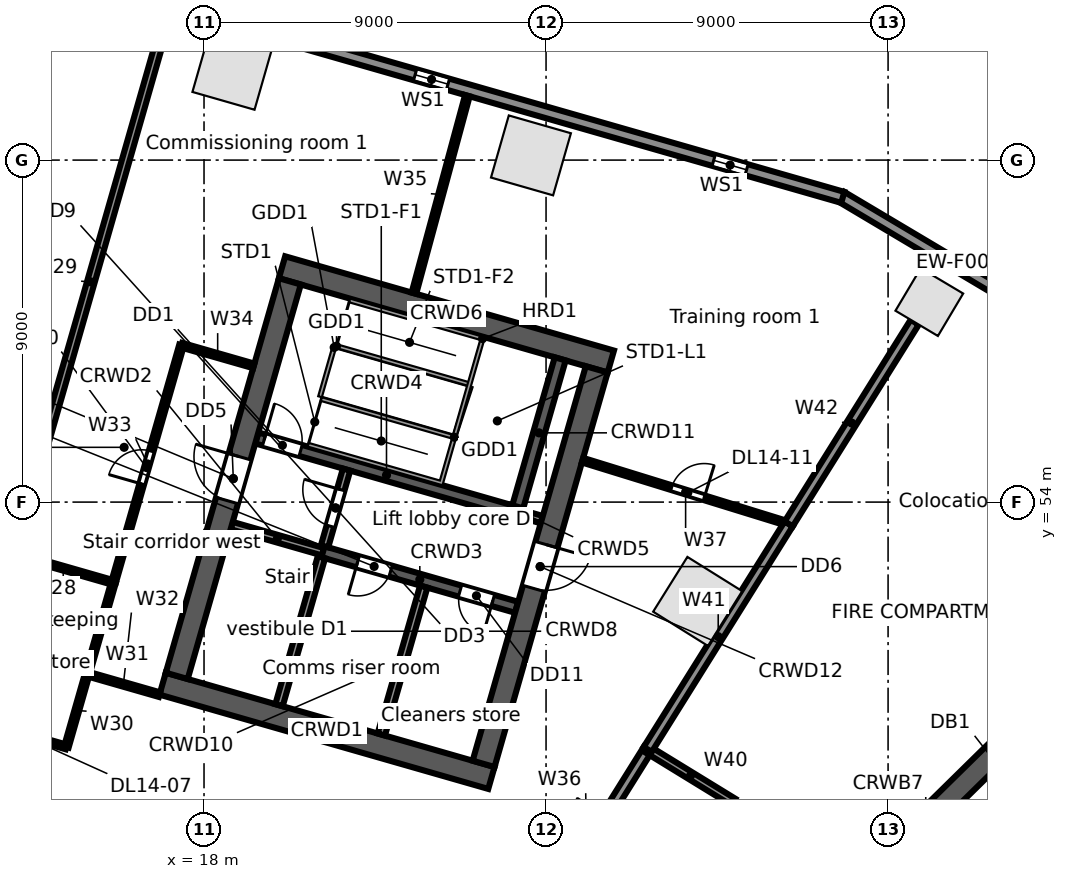
"""IFC4 building model, lengths in metres.
Left out: names, types, materials, properties, quantities, classifications, styles, units other than length and angle.
Written with IfcOpenShell. Run it as: python <this file> out.ifc"""

import sys

from ifc_helpers import new_model, si_unit, direction, frame, frame_2d, origin, origin_2d, place, context, subcontext, project, spatial, rectangle, extrude, element, fill, save


model = new_model("IFC4")
c1 = context("Model", 3, precision=1e-05, world=origin(), true_north=direction((0.0, 1.0)))
c2 = subcontext(c1, "Body", "Model", "MODEL_VIEW")
j1 = project(units=[si_unit("LENGTHUNIT", "METRE"), si_unit("PLANEANGLEUNIT", "RADIAN")], contexts=[c1])
p1 = place(None, origin())
s1 = spatial("IfcSite", under=j1, at=p1, CompositionType="ELEMENT")
p2 = place(p1, origin())
s2 = spatial("IfcBuilding", under=s1, at=p2, CompositionType="ELEMENT")
p3 = place(p2, frame((0.0, 0.0, 71.5)))
s3 = spatial("IfcBuildingStorey", under=s2, at=p3, CompositionType="ELEMENT", Elevation=71.5)
p4 = place(p3, frame((37.085, 59.262, 0.0), z_axis=(0.0, 0.0, 1.0), x_axis=(-0.859406411501, 0.511293086077, 0.0)))
e1 = element("IfcColumn", 1, at=p4, inside=s3, PredefinedType="COLUMN", context=c2, shape_type="SweptSolid", body=[
    extrude(rectangle(XDim=1.3, YDim=1.3, at=origin_2d()), origin(), (0.0, 0.0, 1.0), 5.0),
])
for number, where, z_axis, x_axis in (
    (2, (26.603, 63.124, 0.0), (0.0, 0.0, 1.0), (-0.961, 0.276, 0.0)),
    (3, (18.746, 65.376, 0.0), (0.0, 0.0, 1.0), (-0.961, 0.276, 0.0)),
    (4, (30.99, 51.386, 0.0), (0.0, 0.0, 1.0), (0.53, 0.848, 0.0)),
):
    element("IfcColumn", number, at=place(p3, frame(where, z_axis=z_axis, x_axis=x_axis)), inside=s3, PredefinedType="COLUMN", context=c2, shape_type="SweptSolid", body=[
        extrude(rectangle(XDim=1.7, YDim=1.7, at=origin_2d()), origin(), (0.0, 0.0, 1.0), 5.0),
    ])
p5 = place(p3, frame((34.773, 62.034, 0.0), z_axis=(0.0, 0.0, 1.0), x_axis=(0.859401317772, -0.511301647769, 0.0)))
e5 = element("IfcWall", 5, at=p5, inside=s3, PredefinedType="STANDARD", context=c2, shape_type="SweptSolid", body=[
    extrude(rectangle(XDim=6.808, YDim=0.3, at=frame_2d((3.404, 0.0))), origin(), (0.0, 0.0, 1.0), 4.68),
])
p6 = place(p3, frame((3.335, 71.044, 0.0), z_axis=(0.0, 0.0, 1.0), x_axis=(0.961260130989, -0.275642813387, 0.0)))
e6 = element("IfcWall", 6, at=p6, inside=s3, PredefinedType="STANDARD", context=c2, shape_type="SweptSolid", body=[
    extrude(rectangle(XDim=32.741, YDim=0.3, at=frame_2d((16.371, 0.0))), origin(), (0.0, 0.0, 1.0), 4.68),
])
p7 = place(p6, frame((29.207, 0.0, 0.6)))
e7 = element("IfcOpeningElement", 7, at=p7, cuts=e6, PredefinedType="OPENING", context=c2, shape_type="SweptSolid", body=[
    extrude(rectangle(XDim=0.9, YDim=3.2, at=frame_2d((0.45, 1.6))), frame((0.0, 0.16, 0.0), z_axis=(0.0, -1.0, 0.0), x_axis=(1.0, 0.0, 0.0)), (0.0, 0.0, 1.0), 0.32),
])
p8 = place(p6, frame((21.034, 0.0, 0.6)))
e8 = element("IfcOpeningElement", 8, at=p8, cuts=e6, PredefinedType="OPENING", context=c2, shape_type="SweptSolid", body=[
    extrude(rectangle(XDim=0.9, YDim=3.2, at=frame_2d((0.45, 1.6))), frame((0.0, 0.16, 0.0), z_axis=(0.0, -1.0, 0.0), x_axis=(1.0, 0.0, 0.0)), (0.0, 0.0, 1.0), 0.32),
])
p9 = place(p6, frame((12.861, 0.0, 0.6)))
e9 = element("IfcOpeningElement", 9, at=p9, cuts=e6, PredefinedType="OPENING", context=c2, shape_type="SweptSolid", body=[
    extrude(rectangle(XDim=0.9, YDim=3.2, at=frame_2d((0.45, 1.6))), frame((0.0, 0.16, 0.0), z_axis=(0.0, -1.0, 0.0), x_axis=(1.0, 0.0, 0.0)), (0.0, 0.0, 1.0), 0.32),
])
p10 = place(p6, frame((4.688, 0.0, 0.6)))
e10 = element("IfcOpeningElement", 10, at=p10, cuts=e6, PredefinedType="OPENING", context=c2, shape_type="SweptSolid", body=[
    extrude(rectangle(XDim=0.9, YDim=3.2, at=frame_2d((0.45, 1.6))), frame((0.0, 0.16, 0.0), z_axis=(0.0, -1.0, 0.0), x_axis=(1.0, 0.0, 0.0)), (0.0, 0.0, 1.0), 0.32),
])
p11 = place(p3, frame((25.398, 40.717, 0.0), z_axis=(0.0, 0.0, 1.0), x_axis=(-0.961262423262, 0.275634819324, 0.0)))
e11 = element("IfcWall", 11, at=p11, inside=s3, PredefinedType="STANDARD", context=c2, shape_type="SweptSolid", body=[
    extrude(rectangle(XDim=26.359, YDim=0.3, at=frame_2d((13.179, 0.0))), origin(), (0.0, 0.0, 1.0), 4.68),
])
p12 = place(p11, frame((22.664, 0.0, 0.6)))
e12 = element("IfcOpeningElement", 12, at=p12, cuts=e11, PredefinedType="OPENING", context=c2, shape_type="SweptSolid", body=[
    extrude(rectangle(XDim=0.9, YDim=3.2, at=frame_2d((0.45, 1.6))), frame((0.0, 0.16, 0.0), z_axis=(0.0, -1.0, 0.0), x_axis=(1.0, 0.0, 0.0)), (0.0, 0.0, 1.0), 0.32),
])
p13 = place(p11, frame((13.844, 0.0, 0.6)))
e13 = element("IfcOpeningElement", 13, at=p13, cuts=e11, PredefinedType="OPENING", context=c2, shape_type="SweptSolid", body=[
    extrude(rectangle(XDim=0.9, YDim=3.2, at=frame_2d((0.45, 1.6))), frame((0.0, 0.16, 0.0), z_axis=(0.0, -1.0, 0.0), x_axis=(1.0, 0.0, 0.0)), (0.0, 0.0, 1.0), 0.32),
])
p14 = place(p11, frame((5.023, 0.0, 0.6)))
e14 = element("IfcOpeningElement", 14, at=p14, cuts=e11, PredefinedType="OPENING", context=c2, shape_type="SweptSolid", body=[
    extrude(rectangle(XDim=0.9, YDim=3.2, at=frame_2d((0.45, 1.6))), frame((0.0, 0.16, 0.0), z_axis=(0.0, -1.0, 0.0), x_axis=(1.0, 0.0, 0.0)), (0.0, 0.0, 1.0), 0.32),
])
p15 = place(p3, frame((32.07, 40.759, 0.0), z_axis=(0.0, 0.0, 1.0), x_axis=(0.713245344712, 0.70091445858, 0.0)))
e15 = element("IfcWall", 15, at=p15, inside=s3, PredefinedType="SOLIDWALL", context=c2, shape_type="SweptSolid", body=[
    extrude(rectangle(XDim=13.8, YDim=0.6, at=frame_2d((6.9, 0.0))), origin(), (0.0, 0.0, 1.0), 4.68),
])
p16 = place(p3, frame((16.911, 49.221, 0.0), z_axis=(0.0, 0.0, 1.0), x_axis=(0.96126248289, -0.275634611374, 0.0)))
e16 = element("IfcWall", 16, at=p16, inside=s3, PredefinedType="SOLIDWALL", context=c2, shape_type="SweptSolid", body=[
    extrude(rectangle(XDim=9.0, YDim=0.6, at=frame_2d((4.5, 0.0))), origin(), (0.0, 0.0, 1.0), 4.68),
])
p17 = place(p3, frame((18.728, 53.382, 0.0), z_axis=(0.0, 0.0, 1.0), x_axis=(0.961247070632, -0.275688355216, 0.0)))
e17 = element("IfcWall", 17, at=p17, inside=s3, PredefinedType="SOLIDWALL", context=c2, shape_type="SweptSolid", body=[
    extrude(rectangle(XDim=2.5, YDim=0.2, at=frame_2d((1.25, 0.0))), origin(), (0.0, 0.0, 1.0), 4.68),
])
p18 = place(p3, frame((21.131, 52.692, 0.0), z_axis=(0.0, 0.0, 1.0), x_axis=(0.961271492568, -0.275603188616, 0.0)))
e18 = element("IfcWall", 18, at=p18, inside=s3, PredefinedType="SOLIDWALL", context=c2, shape_type="SweptSolid", body=[
    extrude(rectangle(XDim=5.3, YDim=0.3, at=frame_2d((2.65, 0.0))), origin(), (0.0, 0.0, 1.0), 4.68),
])
p19 = place(p18, frame((0.95, 0.0, 0.0)))
e19 = element("IfcOpeningElement", 19, at=p19, cuts=e18, PredefinedType="OPENING", context=c2, shape_type="SweptSolid", body=[
    extrude(rectangle(XDim=0.9, YDim=2.1, at=frame_2d((0.45, 1.05))), frame((0.0, 0.16, 0.0), z_axis=(0.0, -1.0, 0.0), x_axis=(1.0, 0.0, 0.0)), (0.0, 0.0, 1.0), 0.32),
])
p20 = place(p18, frame((3.75, 0.0, 0.0)))
e20 = element("IfcOpeningElement", 20, at=p20, cuts=e18, PredefinedType="OPENING", context=c2, shape_type="SweptSolid", body=[
    extrude(rectangle(XDim=0.9, YDim=2.1, at=frame_2d((0.45, 1.05))), frame((0.0, 0.16, 0.0), z_axis=(0.0, -1.0, 0.0), x_axis=(1.0, 0.0, 0.0)), (0.0, 0.0, 1.0), 0.32),
])
p21 = place(p3, frame((19.389, 55.689, 0.0), z_axis=(0.0, 0.0, 1.0), x_axis=(0.961261397636, -0.275638396117, 0.0)))
e21 = element("IfcWall", 21, at=p21, inside=s3, PredefinedType="SOLIDWALL", context=c2, shape_type="SweptSolid", body=[
    extrude(rectangle(XDim=7.1, YDim=0.3, at=frame_2d((3.55, 0.0))), origin(), (0.0, 0.0, 1.0), 4.68),
])
p22 = place(p21, frame((0.2, 0.0, 0.0)))
e22 = element("IfcOpeningElement", 22, at=p22, cuts=e21, PredefinedType="OPENING", context=c2, shape_type="SweptSolid", body=[
    extrude(rectangle(XDim=1.0, YDim=2.1, at=frame_2d((0.5, 1.05))), frame((0.0, 0.16, 0.0), z_axis=(0.0, -1.0, 0.0), x_axis=(1.0, 0.0, 0.0)), (0.0, 0.0, 1.0), 0.32),
])
p23 = place(p3, frame((26.214, 53.732, 0.0), z_axis=(0.0, 0.0, 1.0), x_axis=(0.96122076476, -0.27578005982, 0.0)))
e23 = element("IfcWall", 23, at=p23, inside=s3, PredefinedType="SOLIDWALL", context=c2, shape_type="SweptSolid", body=[
    extrude(rectangle(XDim=0.7, YDim=0.2, at=frame_2d((0.35, 0.0))), origin(), (0.0, 0.0, 1.0), 4.68),
])
p24 = place(p3, frame((20.053, 60.18, 0.0), z_axis=(0.0, 0.0, 1.0), x_axis=(0.96126248289, -0.275634611374, 0.0)))
e24 = element("IfcWall", 24, at=p24, inside=s3, PredefinedType="SOLIDWALL", context=c2, shape_type="SweptSolid", body=[
    extrude(rectangle(XDim=9.0, YDim=0.6, at=frame_2d((4.5, 0.0))), origin(), (0.0, 0.0, 1.0), 4.68),
])
p25 = place(p3, frame((17.282, 49.427, 0.0), z_axis=(0.0, 0.0, 1.0), x_axis=(0.275631631629, 0.961263337304, 0.0)))
e25 = element("IfcWall", 25, at=p25, inside=s3, PredefinedType="SOLIDWALL", context=c2, shape_type="SweptSolid", body=[
    extrude(rectangle(XDim=10.8, YDim=0.6, at=frame_2d((5.4, 0.0))), origin(), (0.0, 0.0, 1.0), 4.68),
])
p26 = place(p25, frame((4.8, 0.0, 0.0)))
e26 = element("IfcOpeningElement", 26, at=p26, cuts=e25, PredefinedType="OPENING", context=c2, shape_type="SweptSolid", body=[
    extrude(rectangle(XDim=1.2, YDim=2.1, at=frame_2d((0.6, 1.05))), frame((0.0, 0.31, 0.0), z_axis=(0.0, -1.0, 0.0), x_axis=(1.0, 0.0, 0.0)), (0.0, 0.0, 1.0), 0.62),
])
p27 = place(p3, frame((19.973, 48.655, 0.0), z_axis=(0.0, 0.0, 1.0), x_axis=(0.275668441653, 0.961252781674, 0.0)))
e27 = element("IfcWall", 27, at=p27, inside=s3, PredefinedType="SOLIDWALL", context=c2, shape_type="SweptSolid", body=[
    extrude(rectangle(XDim=4.05, YDim=0.2, at=frame_2d((2.025, 0.0))), origin(), (0.0, 0.0, 1.0), 4.68),
])
p28 = place(p3, frame((21.172, 52.837, 0.0), z_axis=(0.0, 0.0, 1.0), x_axis=(0.275657676022, 0.961255868981, 0.0)))
e28 = element("IfcWall", 28, at=p28, inside=s3, PredefinedType="PARTITIONING", context=c2, shape_type="SweptSolid", body=[
    extrude(rectangle(XDim=2.1, YDim=0.2, at=frame_2d((1.05, 0.0))), origin(), (0.0, 0.0, 1.0), 4.68),
])
p29 = place(p28, frame((0.55, 0.0, 0.0)))
e29 = element("IfcOpeningElement", 29, at=p29, cuts=e28, PredefinedType="OPENING", context=c2, shape_type="SweptSolid", body=[
    extrude(rectangle(XDim=1.0, YDim=2.1, at=frame_2d((0.5, 1.05))), frame((0.0, 0.11, 0.0), z_axis=(0.0, -1.0, 0.0), x_axis=(1.0, 0.0, 0.0)), (0.0, 0.0, 1.0), 0.22),
])
p30 = place(p3, frame((22.665, 47.883, 0.0), z_axis=(0.0, 0.0, 1.0), x_axis=(0.275596769212, 0.961273333033, 0.0)))
e30 = element("IfcWall", 30, at=p30, inside=s3, PredefinedType="PARTITIONING", context=c2, shape_type="SweptSolid", body=[
    extrude(rectangle(XDim=4.05, YDim=0.2, at=frame_2d((2.025, 0.0))), origin(), (0.0, 0.0, 1.0), 4.68),
])
p31 = place(p3, frame((26.256, 53.876, 0.0), z_axis=(0.0, 0.0, 1.0), x_axis=(0.275612739511, 0.961268754209, 0.0)))
e31 = element("IfcWall", 31, at=p31, inside=s3, PredefinedType="SOLIDWALL", context=c2, shape_type="SweptSolid", body=[
    extrude(rectangle(XDim=4.05, YDim=0.3, at=frame_2d((2.025, 0.0))), origin(), (0.0, 0.0, 1.0), 4.68),
])
p32 = place(p3, frame((25.356, 47.112, 0.0), z_axis=(0.0, 0.0, 1.0), x_axis=(0.275631631629, 0.961263337304, 0.0)))
e32 = element("IfcWall", 32, at=p32, inside=s3, PredefinedType="SOLIDWALL", context=c2, shape_type="SweptSolid", body=[
    extrude(rectangle(XDim=10.8, YDim=0.6, at=frame_2d((5.4, 0.0))), origin(), (0.0, 0.0, 1.0), 4.68),
])
p33 = place(p32, frame((4.8, 0.0, 0.0)))
e33 = element("IfcOpeningElement", 33, at=p33, cuts=e32, PredefinedType="OPENING", context=c2, shape_type="SweptSolid", body=[
    extrude(rectangle(XDim=1.2, YDim=2.1, at=frame_2d((0.6, 1.05))), frame((0.0, 0.31, 0.0), z_axis=(0.0, -1.0, 0.0), x_axis=(1.0, 0.0, 0.0)), (0.0, 0.0, 1.0), 0.62),
])
p34 = place(p3, frame((11.973, 48.244, 0.0), z_axis=(0.0, 0.0, 1.0), x_axis=(0.961302601161, -0.275494662382, 0.0)))
e34 = element("IfcWall", 34, at=p34, inside=s3, PredefinedType="PARTITIONING", context=c2, shape_type="SweptSolid", body=[
    extrude(rectangle(XDim=2.501, YDim=0.125, at=frame_2d((1.25, 0.0))), origin(), (0.0, 0.0, 1.0), 4.68),
])
p35 = place(p34, frame((0.7, 0.0, 0.0)))
e35 = element("IfcOpeningElement", 35, at=p35, cuts=e34, PredefinedType="OPENING", context=c2, shape_type="SweptSolid", body=[
    extrude(rectangle(XDim=0.9, YDim=2.1, at=frame_2d((0.45, 1.05))), frame((0.0, 0.073, 0.0), z_axis=(0.0, -1.0, 0.0), x_axis=(1.0, 0.0, 0.0)), (0.0, 0.0, 1.0), 0.145),
])
p36 = place(p3, frame((12.974, 52.639, 0.0), z_axis=(0.0, 0.0, 1.0), x_axis=(0.961262138292, -0.275635813142, 0.0)))
e36 = element("IfcWall", 36, at=p36, inside=s3, PredefinedType="PARTITIONING", context=c2, shape_type="SweptSolid", body=[
    extrude(rectangle(XDim=2.749, YDim=0.125, at=frame_2d((1.375, 0.0))), origin(), (0.0, 0.0, 1.0), 4.68),
])
p37 = place(p3, frame((12.974, 52.639, 0.0), z_axis=(0.0, 0.0, 1.0), x_axis=(0.275299463768, 0.961358520662, 0.0)))
e37 = element("IfcWall", 37, at=p37, inside=s3, PredefinedType="PARTITIONING", context=c2, shape_type="SweptSolid", body=[
    extrude(rectangle(XDim=14.885, YDim=0.2, at=frame_2d((7.443, 0.0))), origin(), (0.0, 0.0, 1.0), 3.742),
])
p38 = place(p3, frame((14.377, 47.555, 0.0), z_axis=(0.0, 0.0, 1.0), x_axis=(0.275446387355, 0.961316434736, 0.0)))
e38 = element("IfcWall", 38, at=p38, inside=s3, PredefinedType="PARTITIONING", context=c2, shape_type="SweptSolid", body=[
    extrude(rectangle(XDim=2.0, YDim=0.125, at=frame_2d((1.0, 0.0))), origin(), (0.0, 0.0, 1.0), 4.68),
])
p39 = place(p3, frame((14.928, 49.478, 0.0), z_axis=(0.0, 0.0, 1.0), x_axis=(0.275598116036, 0.961272946898, 0.0)))
e39 = element("IfcWall", 39, at=p39, inside=s3, PredefinedType="PARTITIONING", context=c2, shape_type="SweptSolid", body=[
    extrude(rectangle(XDim=2.5, YDim=0.125, at=frame_2d((1.25, 0.0))), origin(), (0.0, 0.0, 1.0), 4.68),
])
p40 = place(p3, frame((14.928, 49.478, 0.0), z_axis=(0.0, 0.0, 1.0), x_axis=(0.961243778232, -0.27569983462, 0.0)))
e40 = element("IfcWall", 40, at=p40, inside=s3, PredefinedType="PARTITIONING", context=c2, shape_type="SweptSolid", body=[
    extrude(rectangle(XDim=1.977, YDim=0.125, at=frame_2d((0.988, 0.0))), origin(), (0.0, 0.0, 1.0), 4.68),
])
p41 = place(p3, frame((15.617, 51.881, 0.0), z_axis=(0.0, 0.0, 1.0), x_axis=(0.275703259795, 0.961242795832, 0.0)))
e41 = element("IfcWall", 41, at=p41, inside=s3, PredefinedType="PARTITIONING", context=c2, shape_type="SweptSolid", body=[
    extrude(rectangle(XDim=6.5, YDim=0.125, at=frame_2d((3.25, 0.0))), origin(), (0.0, 0.0, 1.0), 3.742),
])
p42 = place(p41, frame((2.7, 0.0, 0.0)))
e42 = element("IfcOpeningElement", 42, at=p42, cuts=e41, PredefinedType="OPENING", context=c2, shape_type="SweptSolid", body=[
    extrude(rectangle(XDim=0.9, YDim=2.1, at=frame_2d((0.45, 1.05))), frame((0.0, 0.073, 0.0), z_axis=(0.0, -1.0, 0.0), x_axis=(1.0, 0.0, 0.0)), (0.0, 0.0, 1.0), 0.145),
])
p43 = place(p3, frame((17.409, 58.129, 0.0), z_axis=(0.0, 0.0, 1.0), x_axis=(0.961253165474, -0.275667103345, 0.0)))
e43 = element("IfcWall", 43, at=p43, inside=s3, PredefinedType="PARTITIONING", context=c2, shape_type="SweptSolid", body=[
    extrude(rectangle(XDim=1.977, YDim=0.125, at=frame_2d((0.988, 0.0))), origin(), (0.0, 0.0, 1.0), 4.68),
])
p44 = place(p3, frame((23.523, 59.497, 0.0), z_axis=(0.0, 0.0, 1.0), x_axis=(0.261275557939, 0.965264255437, 0.0)))
e44 = element("IfcWall", 44, at=p44, inside=s3, PredefinedType="PARTITIONING", context=c2, shape_type="SweptSolid", body=[
    extrude(rectangle(XDim=5.385, YDim=0.125, at=frame_2d((2.692, 0.0))), origin(), (0.0, 0.0, 1.0), 3.96),
])
p45 = place(p3, frame((26.456, 42.338, 0.0), z_axis=(0.0, 0.0, 1.0), x_axis=(0.52980027265, 0.848122438743, 0.0)))
e45 = element("IfcWall", 45, at=p45, inside=s3, PredefinedType="PARTITIONING", context=c2, shape_type="SweptSolid", body=[
    extrude(rectangle(XDim=6.076, YDim=0.25, at=frame_2d((3.038, 0.0))), origin(), (0.0, 0.0, 1.0), 4.68),
])
p46 = place(p45, frame((2.2, 0.0, 0.0)))
e46 = element("IfcOpeningElement", 46, at=p46, cuts=e45, PredefinedType="OPENING", context=c2, shape_type="SweptSolid", body=[
    extrude(rectangle(XDim=1.8, YDim=2.1, at=frame_2d((0.9, 1.05))), frame((0.0, 0.135, 0.0), z_axis=(0.0, -1.0, 0.0), x_axis=(1.0, 0.0, 0.0)), (0.0, 0.0, 1.0), 0.27),
])
p47 = place(p3, frame((27.96, 55.103, 0.0), z_axis=(0.0, 0.0, 1.0), x_axis=(0.955442775069, -0.29517639399, 0.0)))
e47 = element("IfcWall", 47, at=p47, inside=s3, PredefinedType="PARTITIONING", context=c2, shape_type="SweptSolid", body=[
    extrude(rectangle(XDim=5.678, YDim=0.125, at=frame_2d((2.839, 0.0))), origin(), (0.0, 0.0, 1.0), 3.748),
])
p48 = place(p47, frame((2.45, 0.0, 0.0)))
e48 = element("IfcOpeningElement", 48, at=p48, cuts=e47, PredefinedType="OPENING", context=c2, shape_type="SweptSolid", body=[
    extrude(rectangle(XDim=0.9, YDim=2.1, at=frame_2d((0.45, 1.05))), frame((0.0, 0.073, 0.0), z_axis=(0.0, -1.0, 0.0), x_axis=(1.0, 0.0, 0.0)), (0.0, 0.0, 1.0), 0.145),
])
p49 = place(p3, frame((29.675, 47.491, 0.0), z_axis=(0.0, 0.0, 1.0), x_axis=(0.852591965232, -0.522577210392, 0.0)))
e49 = element("IfcWall", 49, at=p49, inside=s3, PredefinedType="PARTITIONING", context=c2, shape_type="SweptSolid", body=[
    extrude(rectangle(XDim=2.645, YDim=0.2, at=frame_2d((1.322, 0.0))), origin(), (0.0, 0.0, 1.0), 4.68),
])
p50 = place(p3, frame((29.675, 47.491, 0.0), z_axis=(0.0, 0.0, 1.0), x_axis=(0.529992669945, 0.848002222759, 0.0)))
e50 = element("IfcWall", 50, at=p50, inside=s3, PredefinedType="PARTITIONING", context=c2, shape_type="SweptSolid", body=[
    extrude(rectangle(XDim=7.0, YDim=0.25, at=frame_2d((3.5, 0.0))), origin(), (0.0, 0.0, 1.0), 3.742),
])
p51 = place(p3, frame((33.385, 53.427, 0.0), z_axis=(0.0, 0.0, 1.0), x_axis=(0.529897235032, 0.848061861131, 0.0)))
e51 = element("IfcWall", 51, at=p51, inside=s3, PredefinedType="PARTITIONING", context=c2, shape_type="SweptSolid", body=[
    extrude(rectangle(XDim=6.258, YDim=0.25, at=frame_2d((3.129, 0.0))), origin(), (0.0, 0.0, 1.0), 3.742),
])
p52 = place(p7, origin())
e52 = element("IfcWindow", 52, at=p52, inside=s3, PartitioningType="SINGLE_PANEL", PredefinedType="WINDOW", context=c2, shape_type="SweptSolid", body=[
    extrude(rectangle(XDim=0.9, YDim=3.2, at=frame_2d((0.45, 1.6))), frame((0.0, 0.03, 0.0), z_axis=(0.0, -1.0, 0.0), x_axis=(1.0, 0.0, 0.0)), (0.0, 0.0, 1.0), 0.06),
])
fill(e7, e52)
p53 = place(p8, origin())
e53 = element("IfcWindow", 53, at=p53, inside=s3, PartitioningType="SINGLE_PANEL", PredefinedType="WINDOW", context=c2, shape_type="SweptSolid", body=[
    extrude(rectangle(XDim=0.9, YDim=3.2, at=frame_2d((0.45, 1.6))), frame((0.0, 0.03, 0.0), z_axis=(0.0, -1.0, 0.0), x_axis=(1.0, 0.0, 0.0)), (0.0, 0.0, 1.0), 0.06),
])
fill(e8, e53)
p54 = place(p22, origin())
e54 = element("IfcDoor", 54, at=p54, inside=s3, OperationType="SINGLE_SWING_LEFT", PredefinedType="DOOR", context=c2, shape_type="SweptSolid", body=[
    extrude(rectangle(XDim=1.0, YDim=2.1, at=frame_2d((0.5, 1.05))), frame((0.0, 0.025, 0.0), z_axis=(0.0, -1.0, 0.0), x_axis=(1.0, 0.0, 0.0)), (0.0, 0.0, 1.0), 0.05),
])
fill(e22, e54)
p55 = place(p29, origin())
e55 = element("IfcDoor", 55, at=p55, inside=s3, OperationType="SINGLE_SWING_RIGHT", PredefinedType="DOOR", context=c2, shape_type="SweptSolid", body=[
    extrude(rectangle(XDim=1.0, YDim=2.1, at=frame_2d((0.5, 1.05))), frame((0.0, 0.025, 0.0), z_axis=(0.0, -1.0, 0.0), x_axis=(1.0, 0.0, 0.0)), (0.0, 0.0, 1.0), 0.05),
])
fill(e29, e55)
p56 = place(p26, origin())
e56 = element("IfcDoor", 56, at=p56, inside=s3, OperationType="SINGLE_SWING_RIGHT", PredefinedType="DOOR", context=c2, shape_type="SweptSolid", body=[
    extrude(rectangle(XDim=1.2, YDim=2.1, at=frame_2d((0.6, 1.05))), frame((0.0, 0.025, 0.0), z_axis=(0.0, -1.0, 0.0), x_axis=(1.0, 0.0, 0.0)), (0.0, 0.0, 1.0), 0.05),
])
fill(e26, e56)
p57 = place(p33, frame((1.2, 0.0, 0.0), z_axis=(0.0, 0.0, 1.0), x_axis=(-1.0, 0.0, 0.0)))
e57 = element("IfcDoor", 57, at=p57, inside=s3, OperationType="SINGLE_SWING_LEFT", PredefinedType="DOOR", context=c2, shape_type="SweptSolid", body=[
    extrude(rectangle(XDim=1.2, YDim=2.1, at=frame_2d((0.6, 1.05))), frame((0.0, 0.025, 0.0), z_axis=(0.0, -1.0, 0.0), x_axis=(1.0, 0.0, 0.0)), (0.0, 0.0, 1.0), 0.05),
])
fill(e33, e57)
p58 = place(p19, frame((0.9, 0.0, 0.0), z_axis=(0.0, 0.0, 1.0), x_axis=(-1.0, 0.0, 0.0)))
e58 = element("IfcDoor", 58, at=p58, inside=s3, OperationType="SINGLE_SWING_RIGHT", PredefinedType="DOOR", context=c2, shape_type="SweptSolid", body=[
    extrude(rectangle(XDim=0.9, YDim=2.1, at=frame_2d((0.45, 1.05))), frame((0.0, 0.025, 0.0), z_axis=(0.0, -1.0, 0.0), x_axis=(1.0, 0.0, 0.0)), (0.0, 0.0, 1.0), 0.05),
])
fill(e19, e58)
p59 = place(p20, frame((0.9, 0.0, 0.0), z_axis=(0.0, 0.0, 1.0), x_axis=(-1.0, 0.0, 0.0)))
e59 = element("IfcDoor", 59, at=p59, inside=s3, OperationType="SINGLE_SWING_LEFT", PredefinedType="DOOR", context=c2, shape_type="SweptSolid", body=[
    extrude(rectangle(XDim=0.9, YDim=2.1, at=frame_2d((0.45, 1.05))), frame((0.0, 0.025, 0.0), z_axis=(0.0, -1.0, 0.0), x_axis=(1.0, 0.0, 0.0)), (0.0, 0.0, 1.0), 0.05),
])
fill(e20, e59)
p60 = place(p42, origin())
e60 = element("IfcDoor", 60, at=p60, inside=s3, OperationType="SINGLE_SWING_LEFT", PredefinedType="DOOR", context=c2, shape_type="SweptSolid", body=[
    extrude(rectangle(XDim=0.9, YDim=2.1, at=frame_2d((0.45, 1.05))), frame((0.0, 0.025, 0.0), z_axis=(0.0, -1.0, 0.0), x_axis=(1.0, 0.0, 0.0)), (0.0, 0.0, 1.0), 0.05),
])
fill(e42, e60)
p61 = place(p48, origin())
e61 = element("IfcDoor", 61, at=p61, inside=s3, OperationType="SINGLE_SWING_RIGHT", PredefinedType="DOOR", context=c2, shape_type="SweptSolid", body=[
    extrude(rectangle(XDim=0.9, YDim=2.1, at=frame_2d((0.45, 1.05))), frame((0.0, 0.025, 0.0), z_axis=(0.0, -1.0, 0.0), x_axis=(1.0, 0.0, 0.0)), (0.0, 0.0, 1.0), 0.05),
])
fill(e48, e61)
save(model, sys.argv[1])
